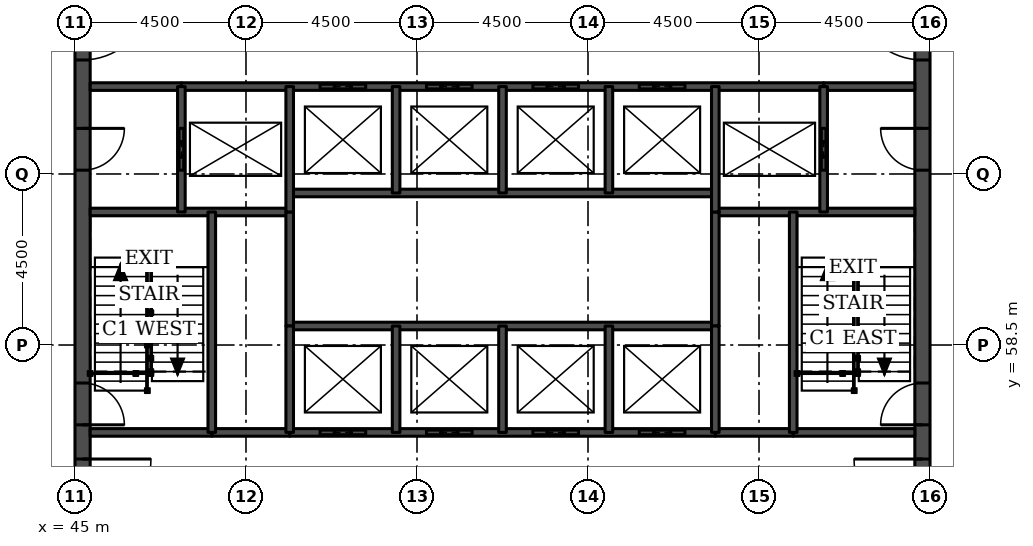
"""IFC4 building model, lengths in metres.
Left out: names, types, materials, properties, quantities, classifications, styles, units other than length and angle.
Written with IfcOpenShell. Run it as: python <this file> out.ifc"""

import sys

from ifc_helpers import new_model, si_unit, direction, frame, frame_2d, origin, place, context, subcontext, project, spatial, rectangle, extrude, element, fill, save


model = new_model("IFC4")
c1 = context("Model", 3, precision=1e-05, world=origin(), true_north=direction((0.0, 1.0)))
c2 = subcontext(c1, "Body", "Model", "MODEL_VIEW")
j1 = project(units=[si_unit("LENGTHUNIT", "METRE"), si_unit("PLANEANGLEUNIT", "RADIAN")], contexts=[c1])
p1 = place(None, origin())
s1 = spatial("IfcSite", under=j1, at=p1, CompositionType="ELEMENT")
p2 = place(p1, origin())
s2 = spatial("IfcBuilding", under=s1, at=p2, CompositionType="ELEMENT")
p3 = place(p2, frame((0.0, 0.0, 219.3)))
s3 = spatial("IfcBuildingStorey", under=s2, at=p3, CompositionType="ELEMENT", Elevation=219.3)
p4 = place(p3, frame((45.2, 49.5, 0.0), z_axis=(0.0, 0.0, 1.0), x_axis=(0.0, 1.0, 0.0)))
e1 = element("IfcWall", 1, at=p4, inside=s3, PredefinedType="SHEAR", context=c2, shape_type="SweptSolid", body=[
    extrude(rectangle(XDim=22.5, YDim=0.4, at=frame_2d((11.25, 0.0))), origin(), (0.0, 0.0, 1.0), 3.7),
])
p5 = place(p4, frame((4.2, 0.0, 0.0)))
e2 = element("IfcOpeningElement", 2, at=p5, cuts=e1, PredefinedType="OPENING", context=c2, shape_type="SweptSolid", body=[
    extrude(rectangle(XDim=1.8, YDim=2.1, at=frame_2d((0.9, 1.05))), frame((0.0, 0.21, 0.0), z_axis=(0.0, -1.0, 0.0), x_axis=(1.0, 0.0, 0.0)), (0.0, 0.0, 1.0), 0.42),
])
p6 = place(p4, frame((6.9, 0.0, 0.0)))
e3 = element("IfcOpeningElement", 3, at=p6, cuts=e1, PredefinedType="OPENING", context=c2, shape_type="SweptSolid", body=[
    extrude(rectangle(XDim=1.1, YDim=2.1, at=frame_2d((0.55, 1.05))), frame((0.0, 0.21, 0.0), z_axis=(0.0, -1.0, 0.0), x_axis=(1.0, 0.0, 0.0)), (0.0, 0.0, 1.0), 0.42),
])
p7 = place(p4, frame((13.6, 0.0, 0.0)))
e4 = element("IfcOpeningElement", 4, at=p7, cuts=e1, PredefinedType="OPENING", context=c2, shape_type="SweptSolid", body=[
    extrude(rectangle(XDim=1.1, YDim=2.1, at=frame_2d((0.55, 1.05))), frame((0.0, 0.21, 0.0), z_axis=(0.0, -1.0, 0.0), x_axis=(1.0, 0.0, 0.0)), (0.0, 0.0, 1.0), 0.42),
])
p8 = place(p4, frame((16.5, 0.0, 0.0)))
e5 = element("IfcOpeningElement", 5, at=p8, cuts=e1, PredefinedType="OPENING", context=c2, shape_type="SweptSolid", body=[
    extrude(rectangle(XDim=1.8, YDim=2.1, at=frame_2d((0.9, 1.05))), frame((0.0, 0.21, 0.0), z_axis=(0.0, -1.0, 0.0), x_axis=(1.0, 0.0, 0.0)), (0.0, 0.0, 1.0), 0.42),
])
p9 = place(p3, frame((67.3, 49.5, 0.0), z_axis=(0.0, 0.0, 1.0), x_axis=(0.0, 1.0, 0.0)))
e6 = element("IfcWall", 6, at=p9, inside=s3, PredefinedType="SHEAR", context=c2, shape_type="SweptSolid", body=[
    extrude(rectangle(XDim=22.5, YDim=0.4, at=frame_2d((11.25, 0.0))), origin(), (0.0, 0.0, 1.0), 3.7),
])
p10 = place(p9, frame((4.2, 0.0, 0.0)))
e7 = element("IfcOpeningElement", 7, at=p10, cuts=e6, PredefinedType="OPENING", context=c2, shape_type="SweptSolid", body=[
    extrude(rectangle(XDim=1.8, YDim=2.1, at=frame_2d((0.9, 1.05))), frame((0.0, 0.21, 0.0), z_axis=(0.0, -1.0, 0.0), x_axis=(1.0, 0.0, 0.0)), (0.0, 0.0, 1.0), 0.42),
])
p11 = place(p9, frame((6.9, 0.0, 0.0)))
e8 = element("IfcOpeningElement", 8, at=p11, cuts=e6, PredefinedType="OPENING", context=c2, shape_type="SweptSolid", body=[
    extrude(rectangle(XDim=1.1, YDim=2.1, at=frame_2d((0.55, 1.05))), frame((0.0, 0.21, 0.0), z_axis=(0.0, -1.0, 0.0), x_axis=(1.0, 0.0, 0.0)), (0.0, 0.0, 1.0), 0.42),
])
p12 = place(p9, frame((13.6, 0.0, 0.0)))
e9 = element("IfcOpeningElement", 9, at=p12, cuts=e6, PredefinedType="OPENING", context=c2, shape_type="SweptSolid", body=[
    extrude(rectangle(XDim=1.1, YDim=2.1, at=frame_2d((0.55, 1.05))), frame((0.0, 0.21, 0.0), z_axis=(0.0, -1.0, 0.0), x_axis=(1.0, 0.0, 0.0)), (0.0, 0.0, 1.0), 0.42),
])
p13 = place(p9, frame((16.5, 0.0, 0.0)))
e10 = element("IfcOpeningElement", 10, at=p13, cuts=e6, PredefinedType="OPENING", context=c2, shape_type="SweptSolid", body=[
    extrude(rectangle(XDim=1.8, YDim=2.1, at=frame_2d((0.9, 1.05))), frame((0.0, 0.21, 0.0), z_axis=(0.0, -1.0, 0.0), x_axis=(1.0, 0.0, 0.0)), (0.0, 0.0, 1.0), 0.42),
])
for number, where, z_axis, x_axis in (
    (11, (48.6, 56.2, 0.0), (0.0, 0.0, 1.0), (1.0, 0.0, 0.0)),
    (12, (61.85, 56.2, 0.0), (0.0, 0.0, 1.0), (1.0, 0.0, 0.0)),
):
    element("IfcWall", number, at=place(p3, frame(where, z_axis=z_axis, x_axis=x_axis)), inside=s3, PredefinedType="SOLIDWALL", context=c2, shape_type="SweptSolid", body=[
        extrude(rectangle(XDim=2.05, YDim=0.2, at=frame_2d((1.025, 0.0))), origin(), (0.0, 0.0, 1.0), 3.55),
    ])
p14 = place(p3, frame((45.4, 56.2, 0.0), z_axis=(0.0, 0.0, 1.0), x_axis=(1.0, 0.0, 0.0)))
e13 = element("IfcWall", 13, at=p14, inside=s3, PredefinedType="SOLIDWALL", context=c2, shape_type="SweptSolid", body=[
    extrude(rectangle(XDim=3.2, YDim=0.2, at=frame_2d((1.6, 0.0))), origin(), (0.0, 0.0, 1.0), 3.55),
])
p15 = place(p3, frame((50.65, 56.2, 0.0), z_axis=(0.0, 0.0, 1.0), x_axis=(1.0, 0.0, 0.0)))
e14 = element("IfcWall", 14, at=p15, inside=s3, PredefinedType="SOLIDWALL", context=c2, shape_type="SweptSolid", body=[
    extrude(rectangle(XDim=11.2, YDim=0.2, at=frame_2d((5.6, 0.0))), origin(), (0.0, 0.0, 1.0), 3.55),
])
p16 = place(p15, frame((0.8, 0.0, 0.0)))
e15 = element("IfcOpeningElement", 15, at=p16, cuts=e14, PredefinedType="OPENING", context=c2, shape_type="SweptSolid", body=[
    extrude(rectangle(XDim=1.2, YDim=2.1, at=frame_2d((0.6, 1.05))), frame((0.0, 0.11, 0.0), z_axis=(0.0, -1.0, 0.0), x_axis=(1.0, 0.0, 0.0)), (0.0, 0.0, 1.0), 0.22),
])
p17 = place(p15, frame((3.6, 0.0, 0.0)))
e16 = element("IfcOpeningElement", 16, at=p17, cuts=e14, PredefinedType="OPENING", context=c2, shape_type="SweptSolid", body=[
    extrude(rectangle(XDim=1.2, YDim=2.1, at=frame_2d((0.6, 1.05))), frame((0.0, 0.11, 0.0), z_axis=(0.0, -1.0, 0.0), x_axis=(1.0, 0.0, 0.0)), (0.0, 0.0, 1.0), 0.22),
])
p18 = place(p15, frame((6.4, 0.0, 0.0)))
e17 = element("IfcOpeningElement", 17, at=p18, cuts=e14, PredefinedType="OPENING", context=c2, shape_type="SweptSolid", body=[
    extrude(rectangle(XDim=1.2, YDim=2.1, at=frame_2d((0.6, 1.05))), frame((0.0, 0.11, 0.0), z_axis=(0.0, -1.0, 0.0), x_axis=(1.0, 0.0, 0.0)), (0.0, 0.0, 1.0), 0.22),
])
p19 = place(p15, frame((9.2, 0.0, 0.0)))
e18 = element("IfcOpeningElement", 18, at=p19, cuts=e14, PredefinedType="OPENING", context=c2, shape_type="SweptSolid", body=[
    extrude(rectangle(XDim=1.2, YDim=2.1, at=frame_2d((0.6, 1.05))), frame((0.0, 0.11, 0.0), z_axis=(0.0, -1.0, 0.0), x_axis=(1.0, 0.0, 0.0)), (0.0, 0.0, 1.0), 0.22),
])
p20 = place(p3, frame((63.9, 56.2, 0.0), z_axis=(0.0, 0.0, 1.0), x_axis=(1.0, 0.0, 0.0)))
e19 = element("IfcWall", 19, at=p20, inside=s3, PredefinedType="SOLIDWALL", context=c2, shape_type="SweptSolid", body=[
    extrude(rectangle(XDim=3.2, YDim=0.2, at=frame_2d((1.6, 0.0))), origin(), (0.0, 0.0, 1.0), 3.55),
])
p21 = place(p3, frame((50.65, 59.0, 0.0), z_axis=(0.0, 0.0, 1.0), x_axis=(1.0, 0.0, 0.0)))
e20 = element("IfcWall", 20, at=p21, inside=s3, PredefinedType="SOLIDWALL", context=c2, shape_type="SweptSolid", body=[
    extrude(rectangle(XDim=11.2, YDim=0.2, at=frame_2d((5.6, 0.0))), origin(), (0.0, 0.0, 1.0), 3.7),
])
for number, where, z_axis, x_axis in (
    (21, (45.4, 62.0, 0.0), (0.0, 0.0, 1.0), (1.0, 0.0, 0.0)),
    (22, (61.85, 62.0, 0.0), (0.0, 0.0, 1.0), (1.0, 0.0, 0.0)),
):
    element("IfcWall", number, at=place(p3, frame(where, z_axis=z_axis, x_axis=x_axis)), inside=s3, PredefinedType="SOLIDWALL", context=c2, shape_type="SweptSolid", body=[
        extrude(rectangle(XDim=5.25, YDim=0.2, at=frame_2d((2.625, 0.0))), origin(), (0.0, 0.0, 1.0), 3.55),
    ])
p22 = place(p3, frame((50.65, 62.5, 0.0), z_axis=(0.0, 0.0, 1.0), x_axis=(1.0, 0.0, 0.0)))
e23 = element("IfcWall", 23, at=p22, inside=s3, PredefinedType="SOLIDWALL", context=c2, shape_type="SweptSolid", body=[
    extrude(rectangle(XDim=11.2, YDim=0.2, at=frame_2d((5.6, 0.0))), origin(), (0.0, 0.0, 1.0), 3.7),
])
for number, where, z_axis, x_axis in (
    (24, (45.4, 65.3, 0.0), (0.0, 0.0, 1.0), (1.0, 0.0, 0.0)),
    (25, (64.7, 65.3, 0.0), (0.0, 0.0, 1.0), (1.0, 0.0, 0.0)),
):
    element("IfcWall", number, at=place(p3, frame(where, z_axis=z_axis, x_axis=x_axis)), inside=s3, PredefinedType="SOLIDWALL", context=c2, shape_type="SweptSolid", body=[
        extrude(rectangle(XDim=2.4, YDim=0.2, at=frame_2d((1.2, 0.0))), origin(), (0.0, 0.0, 1.0), 3.55),
    ])
p23 = place(p3, frame((47.8, 65.3, 0.0), z_axis=(0.0, 0.0, 1.0), x_axis=(1.0, 0.0, 0.0)))
e26 = element("IfcWall", 26, at=p23, inside=s3, PredefinedType="SOLIDWALL", context=c2, shape_type="SweptSolid", body=[
    extrude(rectangle(XDim=16.9, YDim=0.2, at=frame_2d((8.45, 0.0))), origin(), (0.0, 0.0, 1.0), 3.55),
])
p24 = place(p23, frame((3.65, 0.0, 0.0)))
e27 = element("IfcOpeningElement", 27, at=p24, cuts=e26, PredefinedType="OPENING", context=c2, shape_type="SweptSolid", body=[
    extrude(rectangle(XDim=1.2, YDim=2.1, at=frame_2d((0.6, 1.05))), frame((0.0, 0.11, 0.0), z_axis=(0.0, -1.0, 0.0), x_axis=(1.0, 0.0, 0.0)), (0.0, 0.0, 1.0), 0.22),
])
p25 = place(p23, frame((6.45, 0.0, 0.0)))
e28 = element("IfcOpeningElement", 28, at=p25, cuts=e26, PredefinedType="OPENING", context=c2, shape_type="SweptSolid", body=[
    extrude(rectangle(XDim=1.2, YDim=2.1, at=frame_2d((0.6, 1.05))), frame((0.0, 0.11, 0.0), z_axis=(0.0, -1.0, 0.0), x_axis=(1.0, 0.0, 0.0)), (0.0, 0.0, 1.0), 0.22),
])
p26 = place(p23, frame((9.25, 0.0, 0.0)))
e29 = element("IfcOpeningElement", 29, at=p26, cuts=e26, PredefinedType="OPENING", context=c2, shape_type="SweptSolid", body=[
    extrude(rectangle(XDim=1.2, YDim=2.1, at=frame_2d((0.6, 1.05))), frame((0.0, 0.11, 0.0), z_axis=(0.0, -1.0, 0.0), x_axis=(1.0, 0.0, 0.0)), (0.0, 0.0, 1.0), 0.22),
])
p27 = place(p23, frame((12.05, 0.0, 0.0)))
e30 = element("IfcOpeningElement", 30, at=p27, cuts=e26, PredefinedType="OPENING", context=c2, shape_type="SweptSolid", body=[
    extrude(rectangle(XDim=1.2, YDim=2.1, at=frame_2d((0.6, 1.05))), frame((0.0, 0.11, 0.0), z_axis=(0.0, -1.0, 0.0), x_axis=(1.0, 0.0, 0.0)), (0.0, 0.0, 1.0), 0.22),
])
p28 = place(p3, frame((47.8, 62.0, 0.0), z_axis=(0.0, 0.0, 1.0), x_axis=(0.0, 1.0, 0.0)))
e31 = element("IfcWall", 31, at=p28, inside=s3, PredefinedType="SOLIDWALL", context=c2, shape_type="SweptSolid", body=[
    extrude(rectangle(XDim=3.3, YDim=0.2, at=frame_2d((1.65, 0.0))), origin(), (0.0, 0.0, 1.0), 3.55),
])
p29 = place(p28, frame((1.1, 0.0, 0.0)))
e32 = element("IfcOpeningElement", 32, at=p29, cuts=e31, PredefinedType="OPENING", context=c2, shape_type="SweptSolid", body=[
    extrude(rectangle(XDim=1.1, YDim=2.1, at=frame_2d((0.55, 1.05))), frame((0.0, 0.11, 0.0), z_axis=(0.0, -1.0, 0.0), x_axis=(1.0, 0.0, 0.0)), (0.0, 0.0, 1.0), 0.22),
])
p30 = place(p3, frame((48.6, 56.2, 0.0), z_axis=(0.0, 0.0, 1.0), x_axis=(0.0, 1.0, 0.0)))
e33 = element("IfcWall", 33, at=p30, inside=s3, PredefinedType="SOLIDWALL", context=c2, shape_type="SweptSolid", body=[
    extrude(rectangle(XDim=5.8, YDim=0.2, at=frame_2d((2.9, 0.0))), origin(), (0.0, 0.0, 1.0), 3.55),
])
p31 = place(p3, frame((50.65, 59.0, 0.0), z_axis=(0.0, 0.0, 1.0), x_axis=(0.0, 1.0, 0.0)))
e34 = element("IfcWall", 34, at=p31, inside=s3, PredefinedType="SOLIDWALL", context=c2, shape_type="SweptSolid", body=[
    extrude(rectangle(XDim=3.0, YDim=0.2, at=frame_2d((1.5, 0.0))), origin(), (0.0, 0.0, 1.0), 3.7),
])
p32 = place(p3, frame((50.65, 56.2, 0.0), z_axis=(0.0, 0.0, 1.0), x_axis=(0.0, 1.0, 0.0)))
e35 = element("IfcWall", 35, at=p32, inside=s3, PredefinedType="SOLIDWALL", context=c2, shape_type="SweptSolid", body=[
    extrude(rectangle(XDim=2.8, YDim=0.2, at=frame_2d((1.4, 0.0))), origin(), (0.0, 0.0, 1.0), 3.55),
])
p33 = place(p3, frame((50.65, 62.0, 0.0), z_axis=(0.0, 0.0, 1.0), x_axis=(0.0, 1.0, 0.0)))
e36 = element("IfcWall", 36, at=p33, inside=s3, PredefinedType="SOLIDWALL", context=c2, shape_type="SweptSolid", body=[
    extrude(rectangle(XDim=3.3, YDim=0.2, at=frame_2d((1.65, 0.0))), origin(), (0.0, 0.0, 1.0), 3.55),
])
for number, where, z_axis, x_axis in (
    (37, (53.45, 56.2, 0.0), (0.0, 0.0, 1.0), (0.0, 1.0, 0.0)),
    (38, (53.45, 62.5, 0.0), (0.0, 0.0, 1.0), (0.0, 1.0, 0.0)),
    (39, (56.25, 56.2, 0.0), (0.0, 0.0, 1.0), (0.0, 1.0, 0.0)),
    (40, (56.25, 62.5, 0.0), (0.0, 0.0, 1.0), (0.0, 1.0, 0.0)),
    (41, (59.05, 56.2, 0.0), (0.0, 0.0, 1.0), (0.0, 1.0, 0.0)),
    (42, (59.05, 62.5, 0.0), (0.0, 0.0, 1.0), (0.0, 1.0, 0.0)),
):
    element("IfcWall", number, at=place(p3, frame(where, z_axis=z_axis, x_axis=x_axis)), inside=s3, PredefinedType="SOLIDWALL", context=c2, shape_type="SweptSolid", body=[
        extrude(rectangle(XDim=2.8, YDim=0.2, at=frame_2d((1.4, 0.0))), origin(), (0.0, 0.0, 1.0), 3.55),
    ])
p34 = place(p3, frame((61.85, 59.0, 0.0), z_axis=(0.0, 0.0, 1.0), x_axis=(0.0, 1.0, 0.0)))
e43 = element("IfcWall", 43, at=p34, inside=s3, PredefinedType="SOLIDWALL", context=c2, shape_type="SweptSolid", body=[
    extrude(rectangle(XDim=3.0, YDim=0.2, at=frame_2d((1.5, 0.0))), origin(), (0.0, 0.0, 1.0), 3.7),
])
p35 = place(p3, frame((61.85, 56.2, 0.0), z_axis=(0.0, 0.0, 1.0), x_axis=(0.0, 1.0, 0.0)))
e44 = element("IfcWall", 44, at=p35, inside=s3, PredefinedType="SOLIDWALL", context=c2, shape_type="SweptSolid", body=[
    extrude(rectangle(XDim=2.8, YDim=0.2, at=frame_2d((1.4, 0.0))), origin(), (0.0, 0.0, 1.0), 3.55),
])
p36 = place(p3, frame((61.85, 62.0, 0.0), z_axis=(0.0, 0.0, 1.0), x_axis=(0.0, 1.0, 0.0)))
e45 = element("IfcWall", 45, at=p36, inside=s3, PredefinedType="SOLIDWALL", context=c2, shape_type="SweptSolid", body=[
    extrude(rectangle(XDim=3.3, YDim=0.2, at=frame_2d((1.65, 0.0))), origin(), (0.0, 0.0, 1.0), 3.55),
])
p37 = place(p3, frame((63.9, 56.2, 0.0), z_axis=(0.0, 0.0, 1.0), x_axis=(0.0, 1.0, 0.0)))
e46 = element("IfcWall", 46, at=p37, inside=s3, PredefinedType="SOLIDWALL", context=c2, shape_type="SweptSolid", body=[
    extrude(rectangle(XDim=5.8, YDim=0.2, at=frame_2d((2.9, 0.0))), origin(), (0.0, 0.0, 1.0), 3.55),
])
p38 = place(p3, frame((64.7, 62.0, 0.0), z_axis=(0.0, 0.0, 1.0), x_axis=(0.0, 1.0, 0.0)))
e47 = element("IfcWall", 47, at=p38, inside=s3, PredefinedType="SOLIDWALL", context=c2, shape_type="SweptSolid", body=[
    extrude(rectangle(XDim=3.3, YDim=0.2, at=frame_2d((1.65, 0.0))), origin(), (0.0, 0.0, 1.0), 3.55),
])
p39 = place(p38, frame((1.1, 0.0, 0.0)))
e48 = element("IfcOpeningElement", 48, at=p39, cuts=e47, PredefinedType="OPENING", context=c2, shape_type="SweptSolid", body=[
    extrude(rectangle(XDim=1.1, YDim=2.1, at=frame_2d((0.55, 1.05))), frame((0.0, 0.11, 0.0), z_axis=(0.0, -1.0, 0.0), x_axis=(1.0, 0.0, 0.0)), (0.0, 0.0, 1.0), 0.22),
])
p40 = place(p16, origin())
e49 = element("IfcDoor", 49, at=p40, inside=s3, OperationType="DOUBLE_DOOR_SLIDING", PredefinedType="DOOR", context=c2, shape_type="SweptSolid", body=[
    extrude(rectangle(XDim=1.2, YDim=2.1, at=frame_2d((0.6, 1.05))), frame((0.0, 0.025, 0.0), z_axis=(0.0, -1.0, 0.0), x_axis=(1.0, 0.0, 0.0)), (0.0, 0.0, 1.0), 0.05),
])
fill(e15, e49)
p41 = place(p17, origin())
e50 = element("IfcDoor", 50, at=p41, inside=s3, OperationType="DOUBLE_DOOR_SLIDING", PredefinedType="DOOR", context=c2, shape_type="SweptSolid", body=[
    extrude(rectangle(XDim=1.2, YDim=2.1, at=frame_2d((0.6, 1.05))), frame((0.0, 0.025, 0.0), z_axis=(0.0, -1.0, 0.0), x_axis=(1.0, 0.0, 0.0)), (0.0, 0.0, 1.0), 0.05),
])
fill(e16, e50)
p42 = place(p18, origin())
e51 = element("IfcDoor", 51, at=p42, inside=s3, OperationType="DOUBLE_DOOR_SLIDING", PredefinedType="DOOR", context=c2, shape_type="SweptSolid", body=[
    extrude(rectangle(XDim=1.2, YDim=2.1, at=frame_2d((0.6, 1.05))), frame((0.0, 0.025, 0.0), z_axis=(0.0, -1.0, 0.0), x_axis=(1.0, 0.0, 0.0)), (0.0, 0.0, 1.0), 0.05),
])
fill(e17, e51)
p43 = place(p19, origin())
e52 = element("IfcDoor", 52, at=p43, inside=s3, OperationType="DOUBLE_DOOR_SLIDING", PredefinedType="DOOR", context=c2, shape_type="SweptSolid", body=[
    extrude(rectangle(XDim=1.2, YDim=2.1, at=frame_2d((0.6, 1.05))), frame((0.0, 0.025, 0.0), z_axis=(0.0, -1.0, 0.0), x_axis=(1.0, 0.0, 0.0)), (0.0, 0.0, 1.0), 0.05),
])
fill(e18, e52)
p44 = place(p24, origin())
e53 = element("IfcDoor", 53, at=p44, inside=s3, OperationType="DOUBLE_DOOR_SLIDING", PredefinedType="DOOR", context=c2, shape_type="SweptSolid", body=[
    extrude(rectangle(XDim=1.2, YDim=2.1, at=frame_2d((0.6, 1.05))), frame((0.0, 0.025, 0.0), z_axis=(0.0, -1.0, 0.0), x_axis=(1.0, 0.0, 0.0)), (0.0, 0.0, 1.0), 0.05),
])
fill(e27, e53)
p45 = place(p25, origin())
e54 = element("IfcDoor", 54, at=p45, inside=s3, OperationType="DOUBLE_DOOR_SLIDING", PredefinedType="DOOR", context=c2, shape_type="SweptSolid", body=[
    extrude(rectangle(XDim=1.2, YDim=2.1, at=frame_2d((0.6, 1.05))), frame((0.0, 0.025, 0.0), z_axis=(0.0, -1.0, 0.0), x_axis=(1.0, 0.0, 0.0)), (0.0, 0.0, 1.0), 0.05),
])
fill(e28, e54)
p46 = place(p26, origin())
e55 = element("IfcDoor", 55, at=p46, inside=s3, OperationType="DOUBLE_DOOR_SLIDING", PredefinedType="DOOR", context=c2, shape_type="SweptSolid", body=[
    extrude(rectangle(XDim=1.2, YDim=2.1, at=frame_2d((0.6, 1.05))), frame((0.0, 0.025, 0.0), z_axis=(0.0, -1.0, 0.0), x_axis=(1.0, 0.0, 0.0)), (0.0, 0.0, 1.0), 0.05),
])
fill(e29, e55)
p47 = place(p27, origin())
e56 = element("IfcDoor", 56, at=p47, inside=s3, OperationType="DOUBLE_DOOR_SLIDING", PredefinedType="DOOR", context=c2, shape_type="SweptSolid", body=[
    extrude(rectangle(XDim=1.2, YDim=2.1, at=frame_2d((0.6, 1.05))), frame((0.0, 0.025, 0.0), z_axis=(0.0, -1.0, 0.0), x_axis=(1.0, 0.0, 0.0)), (0.0, 0.0, 1.0), 0.05),
])
fill(e30, e56)
p48 = place(p29, origin())
e57 = element("IfcDoor", 57, at=p48, inside=s3, OperationType="DOUBLE_DOOR_SLIDING", PredefinedType="DOOR", context=c2, shape_type="SweptSolid", body=[
    extrude(rectangle(XDim=1.1, YDim=2.1, at=frame_2d((0.55, 1.05))), frame((0.0, 0.025, 0.0), z_axis=(0.0, -1.0, 0.0), x_axis=(1.0, 0.0, 0.0)), (0.0, 0.0, 1.0), 0.05),
])
fill(e32, e57)
p49 = place(p39, origin())
e58 = element("IfcDoor", 58, at=p49, inside=s3, OperationType="DOUBLE_DOOR_SLIDING", PredefinedType="DOOR", context=c2, shape_type="SweptSolid", body=[
    extrude(rectangle(XDim=1.1, YDim=2.1, at=frame_2d((0.55, 1.05))), frame((0.0, 0.025, 0.0), z_axis=(0.0, -1.0, 0.0), x_axis=(1.0, 0.0, 0.0)), (0.0, 0.0, 1.0), 0.05),
])
fill(e48, e58)
p50 = place(p5, frame((1.8, 0.0, 0.0), z_axis=(0.0, 0.0, 1.0), x_axis=(-1.0, 0.0, 0.0)))
e59 = element("IfcDoor", 59, at=p50, inside=s3, OperationType="SINGLE_SWING_LEFT", PredefinedType="DOOR", context=c2, shape_type="SweptSolid", body=[
    extrude(rectangle(XDim=1.8, YDim=2.1, at=frame_2d((0.9, 1.05))), frame((0.0, 0.025, 0.0), z_axis=(0.0, -1.0, 0.0), x_axis=(1.0, 0.0, 0.0)), (0.0, 0.0, 1.0), 0.05),
])
fill(e2, e59)
p51 = place(p6, frame((1.1, 0.0, 0.0), z_axis=(0.0, 0.0, 1.0), x_axis=(-1.0, 0.0, 0.0)))
e60 = element("IfcDoor", 60, at=p51, inside=s3, OperationType="SINGLE_SWING_RIGHT", PredefinedType="DOOR", context=c2, shape_type="SweptSolid", body=[
    extrude(rectangle(XDim=1.1, YDim=2.1, at=frame_2d((0.55, 1.05))), frame((0.0, 0.025, 0.0), z_axis=(0.0, -1.0, 0.0), x_axis=(1.0, 0.0, 0.0)), (0.0, 0.0, 1.0), 0.05),
])
fill(e3, e60)
p52 = place(p7, frame((1.1, 0.0, 0.0), z_axis=(0.0, 0.0, 1.0), x_axis=(-1.0, 0.0, 0.0)))
e61 = element("IfcDoor", 61, at=p52, inside=s3, OperationType="SINGLE_SWING_LEFT", PredefinedType="DOOR", context=c2, shape_type="SweptSolid", body=[
    extrude(rectangle(XDim=1.1, YDim=2.1, at=frame_2d((0.55, 1.05))), frame((0.0, 0.025, 0.0), z_axis=(0.0, -1.0, 0.0), x_axis=(1.0, 0.0, 0.0)), (0.0, 0.0, 1.0), 0.05),
])
fill(e4, e61)
p53 = place(p8, frame((1.8, 0.0, 0.0), z_axis=(0.0, 0.0, 1.0), x_axis=(-1.0, 0.0, 0.0)))
e62 = element("IfcDoor", 62, at=p53, inside=s3, OperationType="SINGLE_SWING_LEFT", PredefinedType="DOOR", context=c2, shape_type="SweptSolid", body=[
    extrude(rectangle(XDim=1.8, YDim=2.1, at=frame_2d((0.9, 1.05))), frame((0.0, 0.025, 0.0), z_axis=(0.0, -1.0, 0.0), x_axis=(1.0, 0.0, 0.0)), (0.0, 0.0, 1.0), 0.05),
])
fill(e5, e62)
p54 = place(p10, origin())
e63 = element("IfcDoor", 63, at=p54, inside=s3, OperationType="SINGLE_SWING_RIGHT", PredefinedType="DOOR", context=c2, shape_type="SweptSolid", body=[
    extrude(rectangle(XDim=1.8, YDim=2.1, at=frame_2d((0.9, 1.05))), frame((0.0, 0.025, 0.0), z_axis=(0.0, -1.0, 0.0), x_axis=(1.0, 0.0, 0.0)), (0.0, 0.0, 1.0), 0.05),
])
fill(e7, e63)
p55 = place(p11, origin())
e64 = element("IfcDoor", 64, at=p55, inside=s3, OperationType="SINGLE_SWING_LEFT", PredefinedType="DOOR", context=c2, shape_type="SweptSolid", body=[
    extrude(rectangle(XDim=1.1, YDim=2.1, at=frame_2d((0.55, 1.05))), frame((0.0, 0.025, 0.0), z_axis=(0.0, -1.0, 0.0), x_axis=(1.0, 0.0, 0.0)), (0.0, 0.0, 1.0), 0.05),
])
fill(e8, e64)
p56 = place(p12, origin())
e65 = element("IfcDoor", 65, at=p56, inside=s3, OperationType="SINGLE_SWING_RIGHT", PredefinedType="DOOR", context=c2, shape_type="SweptSolid", body=[
    extrude(rectangle(XDim=1.1, YDim=2.1, at=frame_2d((0.55, 1.05))), frame((0.0, 0.025, 0.0), z_axis=(0.0, -1.0, 0.0), x_axis=(1.0, 0.0, 0.0)), (0.0, 0.0, 1.0), 0.05),
])
fill(e9, e65)
p57 = place(p13, origin())
e66 = element("IfcDoor", 66, at=p57, inside=s3, OperationType="SINGLE_SWING_RIGHT", PredefinedType="DOOR", context=c2, shape_type="SweptSolid", body=[
    extrude(rectangle(XDim=1.8, YDim=2.1, at=frame_2d((0.9, 1.05))), frame((0.0, 0.025, 0.0), z_axis=(0.0, -1.0, 0.0), x_axis=(1.0, 0.0, 0.0)), (0.0, 0.0, 1.0), 0.05),
])
fill(e10, e66)
save(model, sys.argv[1])
